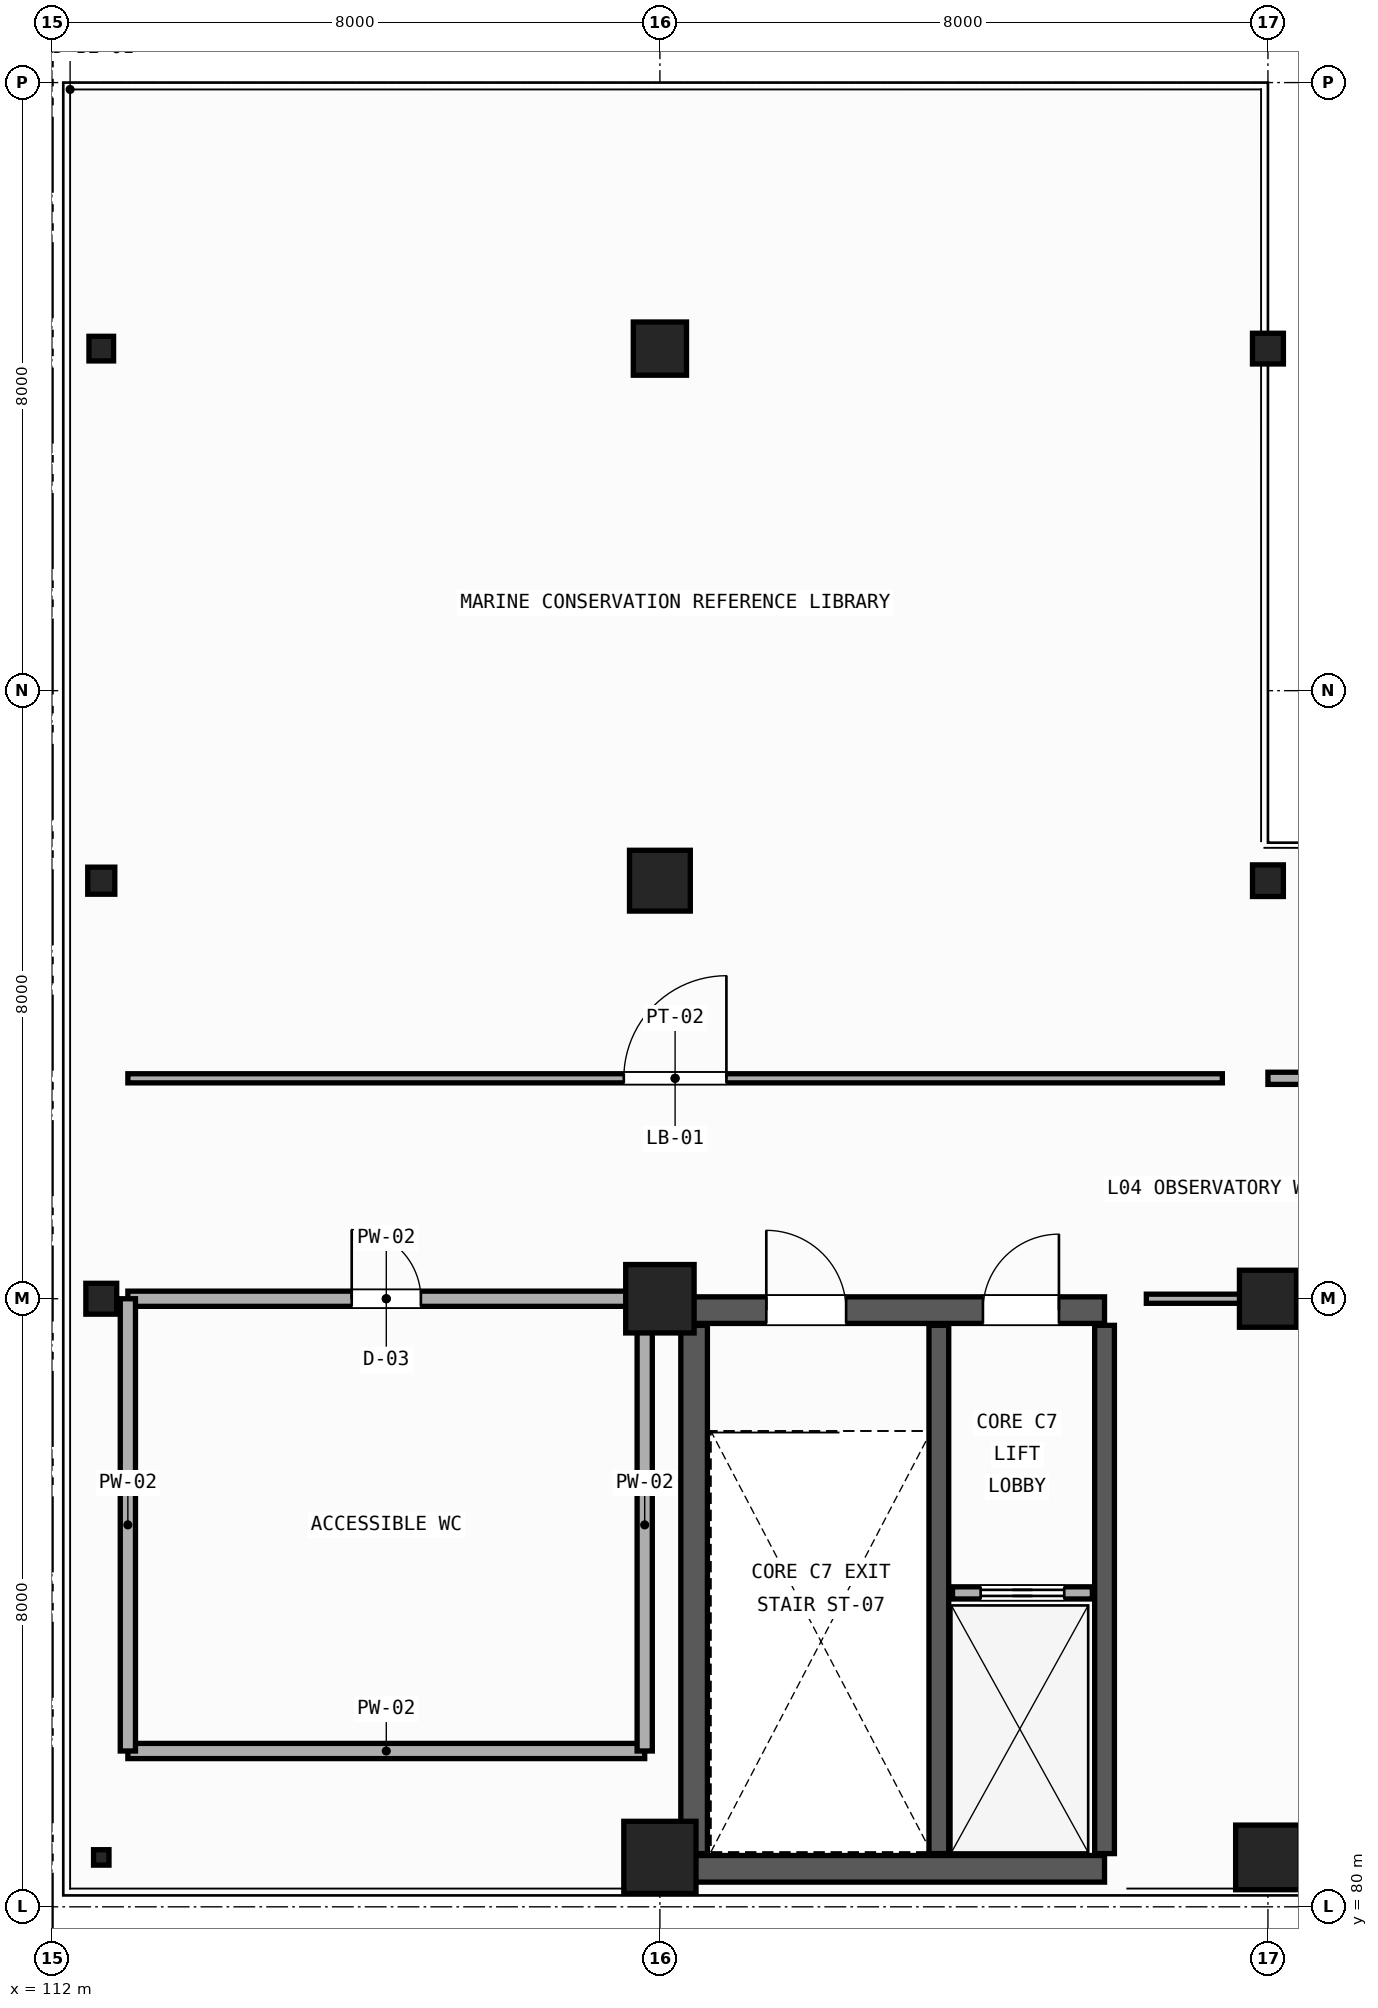
"""IFC4 building model, lengths in metres.
Left out: names, types, materials, properties, quantities, classifications, styles, units other than length and angle.
Written with IfcOpenShell. Run it as: python <this file> out.ifc"""

import sys

from ifc_helpers import new_model, si_unit, direction, frame, frame_2d, origin, origin_2d, place, context, subcontext, project, spatial, rectangle, hollow_rectangle, circle, hollow_circle, i_section, extrude, element, fill, save


model = new_model("IFC4")
c1 = context("Model", 3, precision=1e-05, world=origin(), true_north=direction((0.0, 1.0)))
c2 = subcontext(c1, "Body", "Model", "MODEL_VIEW")
j1 = project(units=[si_unit("LENGTHUNIT", "METRE"), si_unit("PLANEANGLEUNIT", "RADIAN")], contexts=[c1])
p1 = place(None, origin())
s1 = spatial("IfcSite", under=j1, at=p1, CompositionType="ELEMENT")
p2 = place(p1, origin())
s2 = spatial("IfcBuilding", under=s1, at=p2, CompositionType="ELEMENT")
p3 = place(p2, frame((0.0, 0.0, 19.8)))
s3 = spatial("IfcBuildingStorey", under=s2, at=p3, CompositionType="ELEMENT", Elevation=19.8)
p4 = place(p3, frame((112.65, 80.65, 0.0), z_axis=(0.0, 0.0, 1.0), x_axis=(1.0, 0.0, 0.0)))
e1 = element("IfcColumn", 1, at=p4, inside=s3, PredefinedType="COLUMN", context=c2, shape_type="SweptSolid", body=[
    extrude(hollow_rectangle(XDim=0.203, YDim=0.203, WallThickness=0.009, InnerFilletRadius=0.009, OuterFilletRadius=0.018, at=origin_2d()), origin(), (0.0, 0.0, 1.0), 4.8),
])
p5 = place(p3, frame((112.65, 88.0, 0.0), z_axis=(0.0, 0.0, 1.0), x_axis=(0.0, 1.0, 0.0)))
e2 = element("IfcColumn", 2, at=p5, inside=s3, PredefinedType="COLUMN", context=c2, shape_type="SweptSolid", body=[
    extrude(hollow_circle(Radius=0.203, WallThickness=0.012, at=origin_2d()), origin(), (0.0, 0.0, 1.0), 4.8),
])
p6 = place(p3, frame((112.65, 93.5, 0.0), z_axis=(0.0, 0.0, 1.0), x_axis=(1.0, 0.0, 0.0)))
e3 = element("IfcColumn", 3, at=p6, inside=s3, PredefinedType="COLUMN", context=c2, shape_type="SweptSolid", body=[
    extrude(hollow_circle(Radius=0.178, WallThickness=0.012, at=origin_2d()), origin(), (0.0, 0.0, 1.0), 4.8),
])
p7 = place(p3, frame((112.65, 100.5, 0.0), z_axis=(0.0, 0.0, 1.0), x_axis=(0.0, 1.0, 0.0)))
e4 = element("IfcColumn", 4, at=p7, inside=s3, PredefinedType="COLUMN", context=c2, shape_type="SweptSolid", body=[
    extrude(hollow_circle(Radius=0.162, WallThickness=0.012, at=origin_2d()), origin(), (0.0, 0.0, 1.0), 4.8),
])
p8 = place(p3, frame((120.0, 80.65, 0.0), z_axis=(0.0, 0.0, 1.0), x_axis=(0.0, 1.0, 0.0)))
e5 = element("IfcColumn", 5, at=p8, inside=s3, PredefinedType="COLUMN", context=c2, shape_type="SweptSolid", body=[
    extrude(rectangle(XDim=0.95, YDim=0.95, at=origin_2d()), origin(), (0.0, 0.0, 1.0), 4.8),
])
p9 = place(p3, frame((120.0, 88.0, 0.0), z_axis=(0.0, 0.0, 1.0), x_axis=(1.0, 0.0, 0.0)))
e6 = element("IfcColumn", 6, at=p9, inside=s3, PredefinedType="COLUMN", context=c2, shape_type="SweptSolid", body=[
    extrude(rectangle(XDim=0.9, YDim=0.9, at=origin_2d()), origin(), (0.0, 0.0, 1.0), 6.48),
])
p10 = place(p3, frame((120.0, 93.5, 0.0), z_axis=(0.0, 0.0, 1.0), x_axis=(0.0, 1.0, 0.0)))
e7 = element("IfcColumn", 7, at=p10, inside=s3, PredefinedType="COLUMN", context=c2, shape_type="SweptSolid", body=[
    extrude(rectangle(XDim=0.8, YDim=0.8, at=origin_2d()), origin(), (0.0, 0.0, 1.0), 4.8),
])
p11 = place(p3, frame((120.0, 100.5, 0.0), z_axis=(0.0, 0.0, 1.0), x_axis=(1.0, 0.0, 0.0)))
e8 = element("IfcColumn", 8, at=p11, inside=s3, PredefinedType="COLUMN", context=c2, shape_type="SweptSolid", body=[
    extrude(rectangle(XDim=0.7, YDim=0.7, at=origin_2d()), origin(), (0.0, 0.0, 1.0), 4.8),
])
p12 = place(p3, frame((128.0, 80.65, 0.0), z_axis=(0.0, 0.0, 1.0), x_axis=(1.0, 0.0, 0.0)))
e9 = element("IfcColumn", 9, at=p12, inside=s3, PredefinedType="COLUMN", context=c2, shape_type="SweptSolid", body=[
    extrude(circle(Radius=0.425, at=origin_2d()), origin(), (0.0, 0.0, 1.0), 4.8),
])
p13 = place(p3, frame((128.0, 88.0, 0.0), z_axis=(0.0, 0.0, 1.0), x_axis=(0.0, 1.0, 0.0)))
e10 = element("IfcColumn", 10, at=p13, inside=s3, PredefinedType="COLUMN", context=c2, shape_type="SweptSolid", body=[
    extrude(circle(Radius=0.375, at=origin_2d()), origin(), (0.0, 0.0, 1.0), 6.48),
])
p14 = place(p3, frame((128.0, 93.5, 0.0), z_axis=(0.0, 0.0, 1.0), x_axis=(1.0, 0.0, 0.0)))
e11 = element("IfcColumn", 11, at=p14, inside=s3, PredefinedType="COLUMN", context=c2, shape_type="SweptSolid", body=[
    extrude(i_section(OverallWidth=0.406, OverallDepth=0.416, WebThickness=0.03, FlangeThickness=0.048, FilletRadius=0.015, at=origin_2d()), origin(), (0.0, 0.0, 1.0), 4.8),
])
p15 = place(p3, frame((128.0, 100.5, 0.0), z_axis=(0.0, 0.0, 1.0), x_axis=(0.0, 1.0, 0.0)))
e12 = element("IfcColumn", 12, at=p15, inside=s3, PredefinedType="COLUMN", context=c2, shape_type="SweptSolid", body=[
    extrude(i_section(OverallWidth=0.404, OverallDepth=0.407, WebThickness=0.027, FlangeThickness=0.044, FilletRadius=0.015, at=origin_2d()), origin(), (0.0, 0.0, 1.0), 4.8),
])
p16 = place(p3, frame((120.0, 87.85, 0.0), z_axis=(0.0, 0.0, 1.0), x_axis=(1.0, 0.0, 0.0)))
e13 = element("IfcWall", 13, at=p16, inside=s3, PredefinedType="SHEAR", context=c2, shape_type="SweptSolid", body=[
    extrude(rectangle(XDim=5.85, YDim=0.35, at=frame_2d((2.925, 0.0))), origin(), (0.0, 0.0, 1.0), 4.3),
])
p17 = place(p16, frame((1.4, 0.0, 0.0)))
e14 = element("IfcOpeningElement", 14, at=p17, cuts=e13, PredefinedType="OPENING", context=c2, shape_type="SweptSolid", body=[
    extrude(rectangle(XDim=1.05, YDim=2.1, at=frame_2d((0.525, 1.05))), frame((0.0, 0.185, 0.0), z_axis=(0.0, -1.0, 0.0), x_axis=(1.0, 0.0, 0.0)), (0.0, 0.0, 1.0), 0.37),
])
p18 = place(p16, frame((4.25, 0.0, 0.0)))
e15 = element("IfcOpeningElement", 15, at=p18, cuts=e13, PredefinedType="OPENING", context=c2, shape_type="SweptSolid", body=[
    extrude(rectangle(XDim=1.0, YDim=2.15, at=frame_2d((0.5, 1.075))), frame((0.0, 0.185, 0.0), z_axis=(0.0, -1.0, 0.0), x_axis=(1.0, 0.0, 0.0)), (0.0, 0.0, 1.0), 0.37),
])
p19 = place(p3, frame((120.0, 80.5, 0.0), z_axis=(0.0, 0.0, 1.0), x_axis=(1.0, 0.0, 0.0)))
e16 = element("IfcWall", 16, at=p19, inside=s3, PredefinedType="SHEAR", context=c2, shape_type="SweptSolid", body=[
    extrude(rectangle(XDim=5.85, YDim=0.35, at=frame_2d((2.925, 0.0))), origin(), (0.0, 0.0, 1.0), 4.3),
])
p20 = place(p3, frame((120.45, 80.7, 0.0), z_axis=(0.0, 0.0, 1.0), x_axis=(0.0, 1.0, 0.0)))
e17 = element("IfcWall", 17, at=p20, inside=s3, PredefinedType="SHEAR", context=c2, shape_type="SweptSolid", body=[
    extrude(rectangle(XDim=6.95, YDim=0.35, at=frame_2d((3.475, 0.0))), origin(), (0.0, 0.0, 1.0), 4.3),
])
for number, where, z_axis, x_axis in (
    (18, (125.85, 80.7, 0.0), (0.0, 0.0, 1.0), (0.0, 1.0, 0.0)),
    (19, (123.67, 80.7, 0.0), (0.0, 0.0, 1.0), (0.0, 1.0, 0.0)),
):
    element("IfcWall", number, at=place(p3, frame(where, z_axis=z_axis, x_axis=x_axis)), inside=s3, PredefinedType="SHEAR", context=c2, shape_type="SweptSolid", body=[
        extrude(rectangle(XDim=6.95, YDim=0.26, at=frame_2d((3.475, 0.0))), origin(), (0.0, 0.0, 1.0), 4.3),
    ])
p21 = place(p3, frame((123.85, 84.13, 0.0), z_axis=(0.0, 0.0, 1.0), x_axis=(1.0, 0.0, 0.0)))
e20 = element("IfcWall", 20, at=p21, inside=s3, PredefinedType="PARTITIONING", context=c2, shape_type="SweptSolid", body=[
    extrude(rectangle(XDim=1.84, YDim=0.16, at=frame_2d((0.92, 0.0))), origin(), (0.0, 0.0, 1.0), 3.6),
])
p22 = place(p21, frame((0.37, 0.0, 0.0)))
e21 = element("IfcOpeningElement", 21, at=p22, cuts=e20, PredefinedType="OPENING", context=c2, shape_type="SweptSolid", body=[
    extrude(rectangle(XDim=1.1, YDim=2.15, at=frame_2d((0.55, 1.075))), frame((0.0, 0.09, 0.0), z_axis=(0.0, -1.0, 0.0), x_axis=(1.0, 0.0, 0.0)), (0.0, 0.0, 1.0), 0.18),
])
p23 = place(p3, frame((113.0, 88.0, 0.0), z_axis=(0.0, 0.0, 1.0), x_axis=(1.0, 0.0, 0.0)))
e22 = element("IfcWall", 22, at=p23, inside=s3, PredefinedType="PLUMBINGWALL", context=c2, shape_type="SweptSolid", body=[
    extrude(rectangle(XDim=6.8, YDim=0.2, at=frame_2d((3.4, 0.0))), origin(), (0.0, 0.0, 1.0), 4.29),
])
p24 = place(p23, frame((2.945, 0.0, 0.0)))
e23 = element("IfcOpeningElement", 23, at=p24, cuts=e22, PredefinedType="OPENING", context=c2, shape_type="SweptSolid", body=[
    extrude(rectangle(XDim=0.91, YDim=2.1, at=frame_2d((0.455, 1.05))), frame((0.0, 0.11, 0.0), z_axis=(0.0, -1.0, 0.0), x_axis=(1.0, 0.0, 0.0)), (0.0, 0.0, 1.0), 0.22),
])
p25 = place(p3, frame((113.0, 82.05, 0.0), z_axis=(0.0, 0.0, 1.0), x_axis=(1.0, 0.0, 0.0)))
e24 = element("IfcWall", 24, at=p25, inside=s3, PredefinedType="PLUMBINGWALL", context=c2, shape_type="SweptSolid", body=[
    extrude(rectangle(XDim=6.8, YDim=0.2, at=frame_2d((3.4, 0.0))), origin(), (0.0, 0.0, 1.0), 4.29),
])
for number, where, z_axis, x_axis in (
    (25, (113.0, 82.05, 0.0), (0.0, 0.0, 1.0), (0.0, 1.0, 0.0)),
    (26, (119.8, 82.05, 0.0), (0.0, 0.0, 1.0), (0.0, 1.0, 0.0)),
):
    element("IfcWall", number, at=place(p3, frame(where, z_axis=z_axis, x_axis=x_axis)), inside=s3, PredefinedType="PLUMBINGWALL", context=c2, shape_type="SweptSolid", body=[
        extrude(rectangle(XDim=5.95, YDim=0.2, at=frame_2d((2.975, 0.0))), origin(), (0.0, 0.0, 1.0), 4.29),
    ])
p26 = place(p3, frame((126.4, 88.0, 0.0), z_axis=(0.0, 0.0, 1.0), x_axis=(1.0, 0.0, 0.0)))
e27 = element("IfcWall", 27, at=p26, inside=s3, PredefinedType="PARTITIONING", context=c2, shape_type="SweptSolid", body=[
    extrude(rectangle(XDim=16.8, YDim=0.12, at=frame_2d((8.4, 0.0))), origin(), (0.0, 0.0, 1.0), 4.29),
])
p27 = place(p26, frame((5.011, 0.0, 0.0)))
e28 = element("IfcOpeningElement", 28, at=p27, cuts=e27, PredefinedType="OPENING", context=c2, shape_type="SweptSolid", body=[
    extrude(rectangle(XDim=1.5, YDim=2.3, at=frame_2d((0.75, 1.15))), frame((0.0, 0.07, 0.0), z_axis=(0.0, -1.0, 0.0), x_axis=(1.0, 0.0, 0.0)), (0.0, 0.0, 1.0), 0.14),
])
p28 = place(p3, frame((128.0, 90.9, 0.0), z_axis=(0.0, 0.0, 1.0), x_axis=(1.0, 0.0, 0.0)))
e29 = element("IfcWall", 29, at=p28, inside=s3, PredefinedType="PARTITIONING", context=c2, shape_type="SweptSolid", body=[
    extrude(rectangle(XDim=15.2, YDim=0.16, at=frame_2d((7.6, 0.0))), origin(), (0.0, 0.0, 1.0), 4.29),
])
p29 = place(p28, frame((6.875, 0.0, 0.0)))
e30 = element("IfcOpeningElement", 30, at=p29, cuts=e29, PredefinedType="OPENING", context=c2, shape_type="SweptSolid", body=[
    extrude(rectangle(XDim=1.45, YDim=2.25, at=frame_2d((0.725, 1.125))), frame((0.0, 0.09, 0.0), z_axis=(0.0, -1.0, 0.0), x_axis=(1.0, 0.0, 0.0)), (0.0, 0.0, 1.0), 0.18),
])
p30 = place(p3, frame((113.0, 90.9, 0.0), z_axis=(0.0, 0.0, 1.0), x_axis=(1.0, 0.0, 0.0)))
e31 = element("IfcWall", 31, at=p30, inside=s3, PredefinedType="PARTITIONING", context=c2, shape_type="SweptSolid", body=[
    extrude(rectangle(XDim=14.4, YDim=0.12, at=frame_2d((7.2, 0.0))), origin(), (0.0, 0.0, 1.0), 4.29),
])
p31 = place(p30, frame((6.525, 0.0, 0.0)))
e32 = element("IfcOpeningElement", 32, at=p31, cuts=e31, PredefinedType="OPENING", context=c2, shape_type="SweptSolid", body=[
    extrude(rectangle(XDim=1.35, YDim=2.25, at=frame_2d((0.675, 1.125))), frame((0.0, 0.07, 0.0), z_axis=(0.0, -1.0, 0.0), x_axis=(1.0, 0.0, 0.0)), (0.0, 0.0, 1.0), 0.14),
])
p32 = place(p22, origin())
e33 = element("IfcDoor", 33, at=p32, inside=s3, OperationType="SLIDING_TO_LEFT", PredefinedType="DOOR", context=c2, shape_type="SweptSolid", body=[
    extrude(rectangle(XDim=1.1, YDim=2.15, at=frame_2d((0.55, 1.075))), frame((0.0, 0.025, 0.0), z_axis=(0.0, -1.0, 0.0), x_axis=(1.0, 0.0, 0.0)), (0.0, 0.0, 1.0), 0.05),
])
fill(e21, e33)
p33 = place(p17, origin())
e34 = element("IfcDoor", 34, at=p33, inside=s3, OperationType="SINGLE_SWING_LEFT", PredefinedType="DOOR", context=c2, shape_type="SweptSolid", body=[
    extrude(rectangle(XDim=1.05, YDim=2.1, at=frame_2d((0.525, 1.05))), frame((0.0, 0.025, 0.0), z_axis=(0.0, -1.0, 0.0), x_axis=(1.0, 0.0, 0.0)), (0.0, 0.0, 1.0), 0.05),
])
fill(e14, e34)
p34 = place(p18, origin())
e35 = element("IfcDoor", 35, at=p34, inside=s3, OperationType="SINGLE_SWING_RIGHT", PredefinedType="DOOR", context=c2, shape_type="SweptSolid", body=[
    extrude(rectangle(XDim=1.0, YDim=2.15, at=frame_2d((0.5, 1.075))), frame((0.0, 0.025, 0.0), z_axis=(0.0, -1.0, 0.0), x_axis=(1.0, 0.0, 0.0)), (0.0, 0.0, 1.0), 0.05),
])
fill(e15, e35)
p35 = place(p24, origin())
e36 = element("IfcDoor", 36, at=p35, inside=s3, OperationType="SINGLE_SWING_LEFT", PredefinedType="DOOR", context=c2, shape_type="SweptSolid", body=[
    extrude(rectangle(XDim=0.91, YDim=2.1, at=frame_2d((0.455, 1.05))), frame((0.0, 0.025, 0.0), z_axis=(0.0, -1.0, 0.0), x_axis=(1.0, 0.0, 0.0)), (0.0, 0.0, 1.0), 0.05),
])
fill(e23, e36)
p36 = place(p31, origin())
e37 = element("IfcDoor", 37, at=p36, inside=s3, OperationType="SINGLE_SWING_RIGHT", PredefinedType="DOOR", context=c2, shape_type="SweptSolid", body=[
    extrude(rectangle(XDim=1.35, YDim=2.25, at=frame_2d((0.675, 1.125))), frame((0.0, 0.025, 0.0), z_axis=(0.0, -1.0, 0.0), x_axis=(1.0, 0.0, 0.0)), (0.0, 0.0, 1.0), 0.05),
])
fill(e32, e37)
save(model, sys.argv[1])
